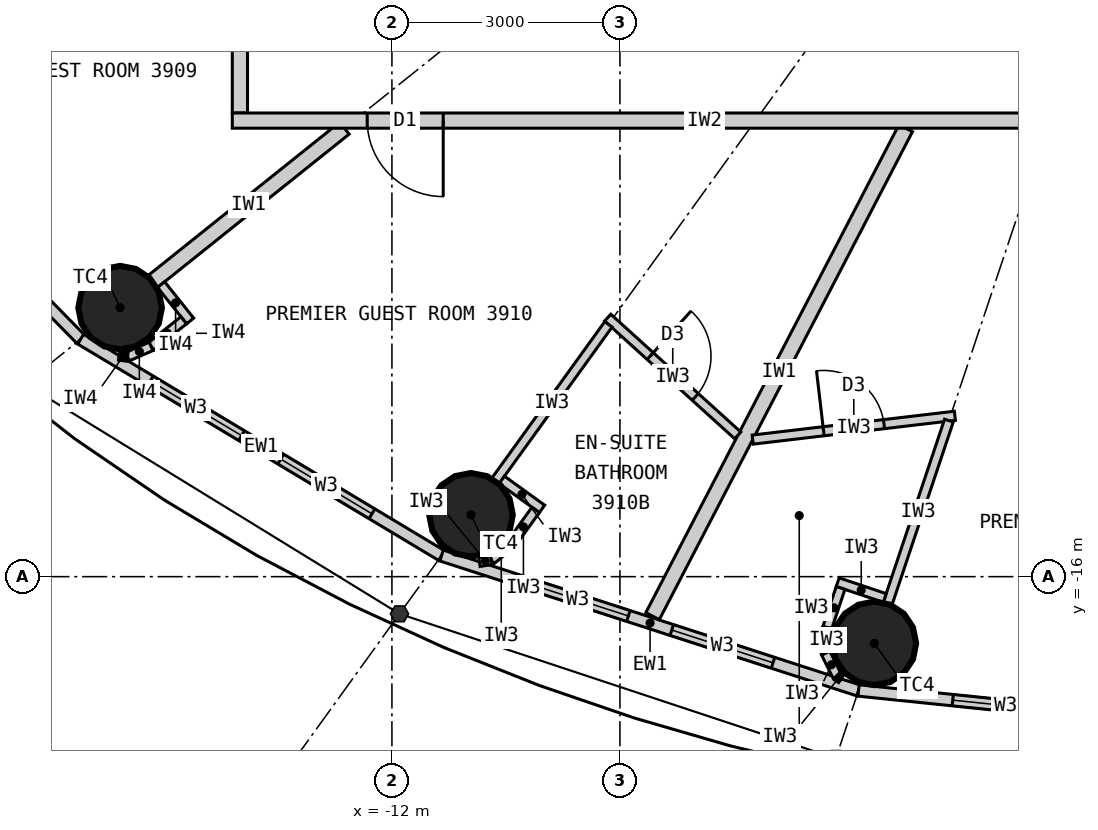
"""IFC4 building model, lengths in metres.
Left out: names, types, materials, properties, quantities, classifications, styles, units other than length and angle.
Written with IfcOpenShell. Run it as: python <this file> out.ifc"""

import sys

from ifc_helpers import new_model, si_unit, direction, frame, frame_2d, origin, origin_2d, place, context, subcontext, project, spatial, rectangle, circle, extrude, element, fill, save


model = new_model("IFC4")
c1 = context("Model", 3, precision=1e-05, world=origin(), true_north=direction((0.0, 1.0)))
c2 = subcontext(c1, "Body", "Model", "MODEL_VIEW")
j1 = project(units=[si_unit("LENGTHUNIT", "METRE"), si_unit("PLANEANGLEUNIT", "RADIAN")], contexts=[c1])
p1 = place(None, origin())
s1 = spatial("IfcSite", under=j1, at=p1, CompositionType="ELEMENT")
p2 = place(p1, origin())
s2 = spatial("IfcBuilding", under=s1, at=p2, CompositionType="ELEMENT")
p3 = place(p2, frame((0.0, 0.0, 150.0)))
s3 = spatial("IfcBuildingStorey", under=s2, at=p3, CompositionType="ELEMENT", Elevation=150.0)
for number, where, z_axis, x_axis in (
    (1, (-15.576, -12.461, 0.0), (0.0, 0.0, 1.0), (1.0, 0.0, 0.0)),
    (2, (-10.96, -15.186, 0.0), (0.0, 0.0, 1.0), (1.0, 0.0, 0.0)),
    (3, (-5.653, -16.877, 0.0), (0.0, 0.0, 1.0), (1.0, 0.0, 0.0)),
):
    element("IfcColumn", number, at=place(p3, frame(where, z_axis=z_axis, x_axis=x_axis)), inside=s3, PredefinedType="COLUMN", context=c2, shape_type="SweptSolid", body=[
        extrude(circle(Radius=0.55, at=origin_2d()), origin(), (0.0, 0.0, 1.0), 3.3),
    ])
p4 = place(p3, frame((-19.772, -9.132, 0.0), z_axis=(0.0, 0.0, 1.0), x_axis=(0.700727467776, -0.71342905457, 0.0)))
e4 = element("IfcWall", 4, at=p4, inside=s3, PredefinedType="ELEMENTEDWALL", context=c2, shape_type="SweptSolid", body=[
    extrude(rectangle(XDim=5.247, YDim=0.15, at=frame_2d((2.624, 0.0))), origin(), (0.0, 0.0, 1.0), 3.12),
])
p5 = place(p4, frame((0.924, 0.0, 0.9)))
e5 = element("IfcOpeningElement", 5, at=p5, cuts=e4, PredefinedType="OPENING", context=c2, shape_type="SweptSolid", body=[
    extrude(rectangle(XDim=1.4, YDim=1.9, at=frame_2d((0.7, 0.95))), frame((0.0, 0.085, 0.0), z_axis=(0.0, -1.0, 0.0), x_axis=(1.0, 0.0, 0.0)), (0.0, 0.0, 1.0), 0.17),
])
p6 = place(p4, frame((2.924, 0.0, 0.9)))
e6 = element("IfcOpeningElement", 6, at=p6, cuts=e4, PredefinedType="OPENING", context=c2, shape_type="SweptSolid", body=[
    extrude(rectangle(XDim=1.4, YDim=1.9, at=frame_2d((0.7, 0.95))), frame((0.0, 0.085, 0.0), z_axis=(0.0, -1.0, 0.0), x_axis=(1.0, 0.0, 0.0)), (0.0, 0.0, 1.0), 0.17),
])
p7 = place(p3, frame((-16.095, -12.876, 0.0), z_axis=(0.0, 0.0, 1.0), x_axis=(0.857695199231, -0.514158482587, 0.0)))
e7 = element("IfcWall", 7, at=p7, inside=s3, PredefinedType="ELEMENTEDWALL", context=c2, shape_type="SweptSolid", body=[
    extrude(rectangle(XDim=5.536, YDim=0.15, at=frame_2d((2.768, 0.0))), origin(), (0.0, 0.0, 1.0), 3.12),
])
p8 = place(p7, frame((1.068, 0.0, 0.9)))
e8 = element("IfcOpeningElement", 8, at=p8, cuts=e7, PredefinedType="OPENING", context=c2, shape_type="SweptSolid", body=[
    extrude(rectangle(XDim=1.4, YDim=1.9, at=frame_2d((0.7, 0.95))), frame((0.0, 0.085, 0.0), z_axis=(0.0, -1.0, 0.0), x_axis=(1.0, 0.0, 0.0)), (0.0, 0.0, 1.0), 0.17),
])
p9 = place(p7, frame((3.068, 0.0, 0.9)))
e9 = element("IfcOpeningElement", 9, at=p9, cuts=e7, PredefinedType="OPENING", context=c2, shape_type="SweptSolid", body=[
    extrude(rectangle(XDim=1.4, YDim=1.9, at=frame_2d((0.7, 0.95))), frame((0.0, 0.085, 0.0), z_axis=(0.0, -1.0, 0.0), x_axis=(1.0, 0.0, 0.0)), (0.0, 0.0, 1.0), 0.17),
])
p10 = place(p3, frame((-11.346, -15.722, 0.0), z_axis=(0.0, 0.0, 1.0), x_axis=(0.951432482129, -0.307857486429, 0.0)))
e10 = element("IfcWall", 10, at=p10, inside=s3, PredefinedType="ELEMENTEDWALL", context=c2, shape_type="SweptSolid", body=[
    extrude(rectangle(XDim=5.766, YDim=0.15, at=frame_2d((2.883, 0.0))), origin(), (0.0, 0.0, 1.0), 3.12),
])
p11 = place(p10, frame((1.183, 0.0, 0.9)))
e11 = element("IfcOpeningElement", 11, at=p11, cuts=e10, PredefinedType="OPENING", context=c2, shape_type="SweptSolid", body=[
    extrude(rectangle(XDim=1.4, YDim=1.9, at=frame_2d((0.7, 0.95))), frame((0.0, 0.085, 0.0), z_axis=(0.0, -1.0, 0.0), x_axis=(1.0, 0.0, 0.0)), (0.0, 0.0, 1.0), 0.17),
])
p12 = place(p10, frame((3.183, 0.0, 0.9)))
e12 = element("IfcOpeningElement", 12, at=p12, cuts=e10, PredefinedType="OPENING", context=c2, shape_type="SweptSolid", body=[
    extrude(rectangle(XDim=1.4, YDim=1.9, at=frame_2d((0.7, 0.95))), frame((0.0, 0.085, 0.0), z_axis=(0.0, -1.0, 0.0), x_axis=(1.0, 0.0, 0.0)), (0.0, 0.0, 1.0), 0.17),
])
p13 = place(p3, frame((-5.86, -17.497, 0.0), z_axis=(0.0, 0.0, 1.0), x_axis=(0.994751738032, -0.102318032045, 0.0)))
e13 = element("IfcWall", 13, at=p13, inside=s3, PredefinedType="ELEMENTEDWALL", context=c2, shape_type="SweptSolid", body=[
    extrude(rectangle(XDim=5.891, YDim=0.15, at=frame_2d((2.946, 0.0))), origin(), (0.0, 0.0, 1.0), 3.12),
])
p14 = place(p13, frame((1.246, 0.0, 0.9)))
e14 = element("IfcOpeningElement", 14, at=p14, cuts=e13, PredefinedType="OPENING", context=c2, shape_type="SweptSolid", body=[
    extrude(rectangle(XDim=1.4, YDim=1.9, at=frame_2d((0.7, 0.95))), frame((0.0, 0.085, 0.0), z_axis=(0.0, -1.0, 0.0), x_axis=(1.0, 0.0, 0.0)), (0.0, 0.0, 1.0), 0.17),
])
p15 = place(p13, frame((3.246, 0.0, 0.9)))
e15 = element("IfcOpeningElement", 15, at=p15, cuts=e13, PredefinedType="OPENING", context=c2, shape_type="SweptSolid", body=[
    extrude(rectangle(XDim=1.4, YDim=1.9, at=frame_2d((0.7, 0.95))), frame((0.0, 0.085, 0.0), z_axis=(0.0, -1.0, 0.0), x_axis=(1.0, 0.0, 0.0)), (0.0, 0.0, 1.0), 0.17),
])
p16 = place(p3, frame((-12.625, -10.1, 0.0), z_axis=(0.0, 0.0, 1.0), x_axis=(-0.780876185034, -0.624685827954, 0.0)))
e16 = element("IfcWall", 16, at=p16, inside=s3, PredefinedType="PARTITIONING", context=c2, shape_type="SweptSolid", body=[
    extrude(rectangle(XDim=3.229, YDim=0.2, at=frame_2d((1.615, 0.0))), origin(), (0.0, 0.0, 1.0), 2.42),
])
p17 = place(p3, frame((-5.24, -10.1, 0.0), z_axis=(0.0, 0.0, 1.0), x_axis=(-0.460532965373, -0.887642601391, 0.0)))
e17 = element("IfcWall", 17, at=p17, inside=s3, PredefinedType="PARTITIONING", context=c2, shape_type="SweptSolid", body=[
    extrude(rectangle(XDim=7.231, YDim=0.2, at=frame_2d((3.616, 0.0))), origin(), (0.0, 0.0, 1.0), 3.12),
])
p18 = place(p3, frame((-7.45, -14.142, 0.0), z_axis=(0.0, 0.0, 1.0), x_axis=(-0.74113984586, 0.671350675041, 0.0)))
e18 = element("IfcWall", 18, at=p18, inside=s3, PredefinedType="PARTITIONING", context=c2, shape_type="SweptSolid", body=[
    extrude(rectangle(XDim=2.309, YDim=0.12, at=frame_2d((1.154, 0.0))), origin(), (0.0, 0.0, 1.0), 3.12),
])
p19 = place(p18, frame((0.754, 0.0, 0.0)))
e19 = element("IfcOpeningElement", 19, at=p19, cuts=e18, PredefinedType="OPENING", context=c2, shape_type="SweptSolid", body=[
    extrude(rectangle(XDim=0.8, YDim=2.1, at=frame_2d((0.4, 1.05))), frame((0.0, 0.07, 0.0), z_axis=(0.0, -1.0, 0.0), x_axis=(1.0, 0.0, 0.0)), (0.0, 0.0, 1.0), 0.14),
])
p20 = place(p3, frame((-9.151, -12.681, 0.0), z_axis=(0.0, 0.0, 1.0), x_axis=(-0.585258912334, -0.8108464747, 0.0)))
e20 = element("IfcWall", 20, at=p20, inside=s3, PredefinedType="PARTITIONING", context=c2, shape_type="SweptSolid", body=[
    extrude(rectangle(XDim=2.54, YDim=0.12, at=frame_2d((1.27, 0.0))), origin(), (0.0, 0.0, 1.0), 2.42),
])
p21 = place(p3, frame((-10.554, -14.727, 0.0), z_axis=(0.0, 0.0, 1.0), x_axis=(0.811044231224, -0.584984833135, 0.0)))
e21 = element("IfcWall", 21, at=p21, inside=s3, PredefinedType="PARTITIONING", context=c2, shape_type="SweptSolid", body=[
    extrude(rectangle(XDim=0.652, YDim=0.12, at=frame_2d((0.326, 0.0))), origin(), (0.0, 0.0, 1.0), 3.12),
])
p22 = place(p3, frame((-10.109, -15.122, 0.0), z_axis=(0.0, 0.0, 1.0), x_axis=(-0.585344718358, -0.810784534072, 0.0)))
e22 = element("IfcWall", 22, at=p22, inside=s3, PredefinedType="PARTITIONING", context=c2, shape_type="SweptSolid", body=[
    extrude(rectangle(XDim=0.55, YDim=0.12, at=frame_2d((0.275, 0.0))), origin(), (0.0, 0.0, 1.0), 3.12),
])
p23 = place(p3, frame((-10.431, -15.568, 0.0), z_axis=(0.0, 0.0, 1.0), x_axis=(-0.77505137267, -0.631898227345, 0.0)))
e23 = element("IfcWall", 23, at=p23, inside=s3, PredefinedType="PARTITIONING", context=c2, shape_type="SweptSolid", body=[
    extrude(rectangle(XDim=0.338, YDim=0.12, at=frame_2d((0.169, 0.0))), origin(), (0.0, 0.0, 1.0), 3.12),
])
p24 = place(p3, frame((-10.693, -15.781, 0.0), z_axis=(0.0, 0.0, 1.0), x_axis=(-0.987256785332, -0.159135287777, 0.0)))
e24 = element("IfcWall", 24, at=p24, inside=s3, PredefinedType="PARTITIONING", context=c2, shape_type="SweptSolid", body=[
    extrude(rectangle(XDim=0.158, YDim=0.12, at=frame_2d((0.079, 0.0))), origin(), (0.0, 0.0, 1.0), 3.12),
])
p25 = place(p3, frame((-7.253, -14.197, 0.0), z_axis=(0.0, 0.0, 1.0), x_axis=(0.993128188393, 0.117031625725, 0.0)))
e25 = element("IfcWall", 25, at=p25, inside=s3, PredefinedType="PARTITIONING", context=c2, shape_type="SweptSolid", body=[
    extrude(rectangle(XDim=2.678, YDim=0.12, at=frame_2d((1.339, 0.0))), origin(), (0.0, 0.0, 1.0), 3.12),
])
p26 = place(p25, frame((0.939, 0.0, 0.0)))
e26 = element("IfcOpeningElement", 26, at=p26, cuts=e25, PredefinedType="OPENING", context=c2, shape_type="SweptSolid", body=[
    extrude(rectangle(XDim=0.8, YDim=2.1, at=frame_2d((0.4, 1.05))), frame((0.0, 0.07, 0.0), z_axis=(0.0, -1.0, 0.0), x_axis=(1.0, 0.0, 0.0)), (0.0, 0.0, 1.0), 0.14),
])
p27 = place(p3, frame((-4.671, -13.948, 0.0), z_axis=(0.0, 0.0, 1.0), x_axis=(-0.317669167093, -0.948201613729, 0.0)))
e27 = element("IfcWall", 27, at=p27, inside=s3, PredefinedType="PARTITIONING", context=c2, shape_type="SweptSolid", body=[
    extrude(rectangle(XDim=2.54, YDim=0.12, at=frame_2d((1.27, 0.0))), origin(), (0.0, 0.0, 1.0), 2.42),
])
p28 = place(p3, frame((-5.516, -16.28, 0.0), z_axis=(0.0, 0.0, 1.0), x_axis=(-0.948157944392, 0.317799484717, 0.0)))
e28 = element("IfcWall", 28, at=p28, inside=s3, PredefinedType="PARTITIONING", context=c2, shape_type="SweptSolid", body=[
    extrude(rectangle(XDim=0.652, YDim=0.12, at=frame_2d((0.326, 0.0))), origin(), (0.0, 0.0, 1.0), 3.12),
])
p29 = place(p3, frame((-6.097, -16.149, 0.0), z_axis=(0.0, 0.0, 1.0), x_axis=(-0.317292604854, -0.948327687514, 0.0)))
e29 = element("IfcWall", 29, at=p29, inside=s3, PredefinedType="PARTITIONING", context=c2, shape_type="SweptSolid", body=[
    extrude(rectangle(XDim=0.55, YDim=0.12, at=frame_2d((0.275, 0.0))), origin(), (0.0, 0.0, 1.0), 3.12),
])
for number, where, z_axis, x_axis in (
    (30, (-6.271, -16.67, 0.0), (0.0, 0.0, 1.0), (-0.061, -0.998, 0.0)),
    (31, (-6.292, -17.007, 0.0), (0.0, 0.0, 1.0), (0.445, -0.895, 0.0)),
):
    element("IfcWall", number, at=place(p3, frame(where, z_axis=z_axis, x_axis=x_axis)), inside=s3, PredefinedType="PARTITIONING", context=c2, shape_type="SweptSolid", body=[
        extrude(rectangle(XDim=0.338, YDim=0.12, at=frame_2d((0.169, 0.0))), origin(), (0.0, 0.0, 1.0), 3.12),
    ])
p30 = place(p3, frame((-6.142, -17.31, 0.0), z_axis=(0.0, 0.0, 1.0), x_axis=(0.835039693181, -0.550189704386, 0.0)))
e32 = element("IfcWall", 32, at=p30, inside=s3, PredefinedType="PARTITIONING", context=c2, shape_type="SweptSolid", body=[
    extrude(rectangle(XDim=0.062, YDim=0.12, at=frame_2d((0.031, 0.0))), origin(), (0.0, 0.0, 1.0), 3.12),
])
p31 = place(p3, frame((-14.0, -1.67, 0.0), z_axis=(0.0, 0.0, 1.0), x_axis=(0.0, -1.0, 0.0)))
e33 = element("IfcWall", 33, at=p31, inside=s3, PredefinedType="PARTITIONING", context=c2, shape_type="SweptSolid", body=[
    extrude(rectangle(XDim=8.23, YDim=0.2, at=frame_2d((4.115, 0.0))), origin(), (0.0, 0.0, 1.0), 3.12),
])
p32 = place(p31, frame((5.552, 0.0, 0.0)))
e34 = element("IfcOpeningElement", 34, at=p32, cuts=e33, PredefinedType="OPENING", context=c2, shape_type="SweptSolid", body=[
    extrude(rectangle(XDim=1.0, YDim=2.2, at=frame_2d((0.5, 1.1))), frame((0.0, 0.11, 0.0), z_axis=(0.0, -1.0, 0.0), x_axis=(1.0, 0.0, 0.0)), (0.0, 0.0, 1.0), 0.22),
])
p33 = place(p3, frame((-1.67, -10.0, 0.0), z_axis=(0.0, 0.0, 1.0), x_axis=(-1.0, 0.0, 0.0)))
e35 = element("IfcWall", 35, at=p33, inside=s3, PredefinedType="PARTITIONING", context=c2, shape_type="SweptSolid", body=[
    extrude(rectangle(XDim=12.43, YDim=0.2, at=frame_2d((6.215, 0.0))), origin(), (0.0, 0.0, 1.0), 3.12),
])
p34 = place(p33, frame((9.655, 0.0, 0.0)))
e36 = element("IfcOpeningElement", 36, at=p34, cuts=e35, PredefinedType="OPENING", context=c2, shape_type="SweptSolid", body=[
    extrude(rectangle(XDim=1.0, YDim=2.2, at=frame_2d((0.5, 1.1))), frame((0.0, 0.11, 0.0), z_axis=(0.0, -1.0, 0.0), x_axis=(1.0, 0.0, 0.0)), (0.0, 0.0, 1.0), 0.22),
])
p35 = place(p3, frame((-15.037, -12.158, 0.0), z_axis=(0.0, 0.0, 1.0), x_axis=(0.624840920722, -0.78075208856, 0.0)))
e37 = element("IfcWall", 37, at=p35, inside=s3, PredefinedType="PARTITIONING", context=c2, shape_type="SweptSolid", body=[
    extrude(rectangle(XDim=0.612, YDim=0.12, at=frame_2d((0.306, 0.0))), origin(), (0.0, 0.0, 1.0), 3.12),
])
p36 = place(p3, frame((-14.739, -12.627, 0.0), z_axis=(0.0, 0.0, 1.0), x_axis=(-0.780912119987, -0.624640905527, 0.0)))
e38 = element("IfcWall", 38, at=p36, inside=s3, PredefinedType="PARTITIONING", context=c2, shape_type="SweptSolid", body=[
    extrude(rectangle(XDim=0.55, YDim=0.12, at=frame_2d((0.275, 0.0))), origin(), (0.0, 0.0, 1.0), 3.12),
])
p37 = place(p3, frame((-15.169, -12.97, 0.0), z_axis=(0.0, 0.0, 1.0), x_axis=(-0.915974725257, -0.401235968838, 0.0)))
e39 = element("IfcWall", 39, at=p37, inside=s3, PredefinedType="PARTITIONING", context=c2, shape_type="SweptSolid", body=[
    extrude(rectangle(XDim=0.338, YDim=0.12, at=frame_2d((0.169, 0.0))), origin(), (0.0, 0.0, 1.0), 3.12),
])
p38 = place(p3, frame((-15.478, -13.106, 0.0), z_axis=(0.0, 0.0, 1.0), x_axis=(-0.993778813557, 0.111371763588, 0.0)))
e40 = element("IfcWall", 40, at=p38, inside=s3, PredefinedType="PARTITIONING", context=c2, shape_type="SweptSolid", body=[
    extrude(rectangle(XDim=0.114, YDim=0.12, at=frame_2d((0.057, 0.0))), origin(), (0.0, 0.0, 1.0), 3.12),
])
p39 = place(p8, origin())
e41 = element("IfcWindow", 41, at=p39, inside=s3, PartitioningType="SINGLE_PANEL", PredefinedType="WINDOW", context=c2, shape_type="SweptSolid", body=[
    extrude(rectangle(XDim=1.4, YDim=1.9, at=frame_2d((0.7, 0.95))), frame((0.0, 0.03, 0.0), z_axis=(0.0, -1.0, 0.0), x_axis=(1.0, 0.0, 0.0)), (0.0, 0.0, 1.0), 0.06),
])
fill(e8, e41)
p40 = place(p9, origin())
e42 = element("IfcWindow", 42, at=p40, inside=s3, PartitioningType="SINGLE_PANEL", PredefinedType="WINDOW", context=c2, shape_type="SweptSolid", body=[
    extrude(rectangle(XDim=1.4, YDim=1.9, at=frame_2d((0.7, 0.95))), frame((0.0, 0.03, 0.0), z_axis=(0.0, -1.0, 0.0), x_axis=(1.0, 0.0, 0.0)), (0.0, 0.0, 1.0), 0.06),
])
fill(e9, e42)
p41 = place(p11, origin())
e43 = element("IfcWindow", 43, at=p41, inside=s3, PartitioningType="SINGLE_PANEL", PredefinedType="WINDOW", context=c2, shape_type="SweptSolid", body=[
    extrude(rectangle(XDim=1.4, YDim=1.9, at=frame_2d((0.7, 0.95))), frame((0.0, 0.03, 0.0), z_axis=(0.0, -1.0, 0.0), x_axis=(1.0, 0.0, 0.0)), (0.0, 0.0, 1.0), 0.06),
])
fill(e11, e43)
p42 = place(p12, origin())
e44 = element("IfcWindow", 44, at=p42, inside=s3, PartitioningType="SINGLE_PANEL", PredefinedType="WINDOW", context=c2, shape_type="SweptSolid", body=[
    extrude(rectangle(XDim=1.4, YDim=1.9, at=frame_2d((0.7, 0.95))), frame((0.0, 0.03, 0.0), z_axis=(0.0, -1.0, 0.0), x_axis=(1.0, 0.0, 0.0)), (0.0, 0.0, 1.0), 0.06),
])
fill(e12, e44)
p43 = place(p14, origin())
e45 = element("IfcWindow", 45, at=p43, inside=s3, PartitioningType="SINGLE_PANEL", PredefinedType="WINDOW", context=c2, shape_type="SweptSolid", body=[
    extrude(rectangle(XDim=1.4, YDim=1.9, at=frame_2d((0.7, 0.95))), frame((0.0, 0.03, 0.0), z_axis=(0.0, -1.0, 0.0), x_axis=(1.0, 0.0, 0.0)), (0.0, 0.0, 1.0), 0.06),
])
fill(e14, e45)
p44 = place(p19, origin())
e46 = element("IfcDoor", 46, at=p44, inside=s3, OperationType="SINGLE_SWING_RIGHT", PredefinedType="DOOR", context=c2, shape_type="SweptSolid", body=[
    extrude(rectangle(XDim=0.8, YDim=2.1, at=frame_2d((0.4, 1.05))), frame((0.0, 0.025, 0.0), z_axis=(0.0, -1.0, 0.0), x_axis=(1.0, 0.0, 0.0)), (0.0, 0.0, 1.0), 0.05),
])
fill(e19, e46)
p45 = place(p34, origin())
e47 = element("IfcDoor", 47, at=p45, inside=s3, OperationType="SINGLE_SWING_LEFT", PredefinedType="DOOR", context=c2, shape_type="SweptSolid", body=[
    extrude(rectangle(XDim=1.0, YDim=2.2, at=frame_2d((0.5, 1.1))), frame((0.0, 0.025, 0.0), z_axis=(0.0, -1.0, 0.0), x_axis=(1.0, 0.0, 0.0)), (0.0, 0.0, 1.0), 0.05),
])
fill(e36, e47)
p46 = place(p26, origin())
e48 = element("IfcDoor", 48, at=p46, inside=s3, OperationType="SINGLE_SWING_LEFT", PredefinedType="DOOR", context=c2, shape_type="SweptSolid", body=[
    extrude(rectangle(XDim=0.8, YDim=2.1, at=frame_2d((0.4, 1.05))), frame((0.0, 0.025, 0.0), z_axis=(0.0, -1.0, 0.0), x_axis=(1.0, 0.0, 0.0)), (0.0, 0.0, 1.0), 0.05),
])
fill(e26, e48)
save(model, sys.argv[1])
